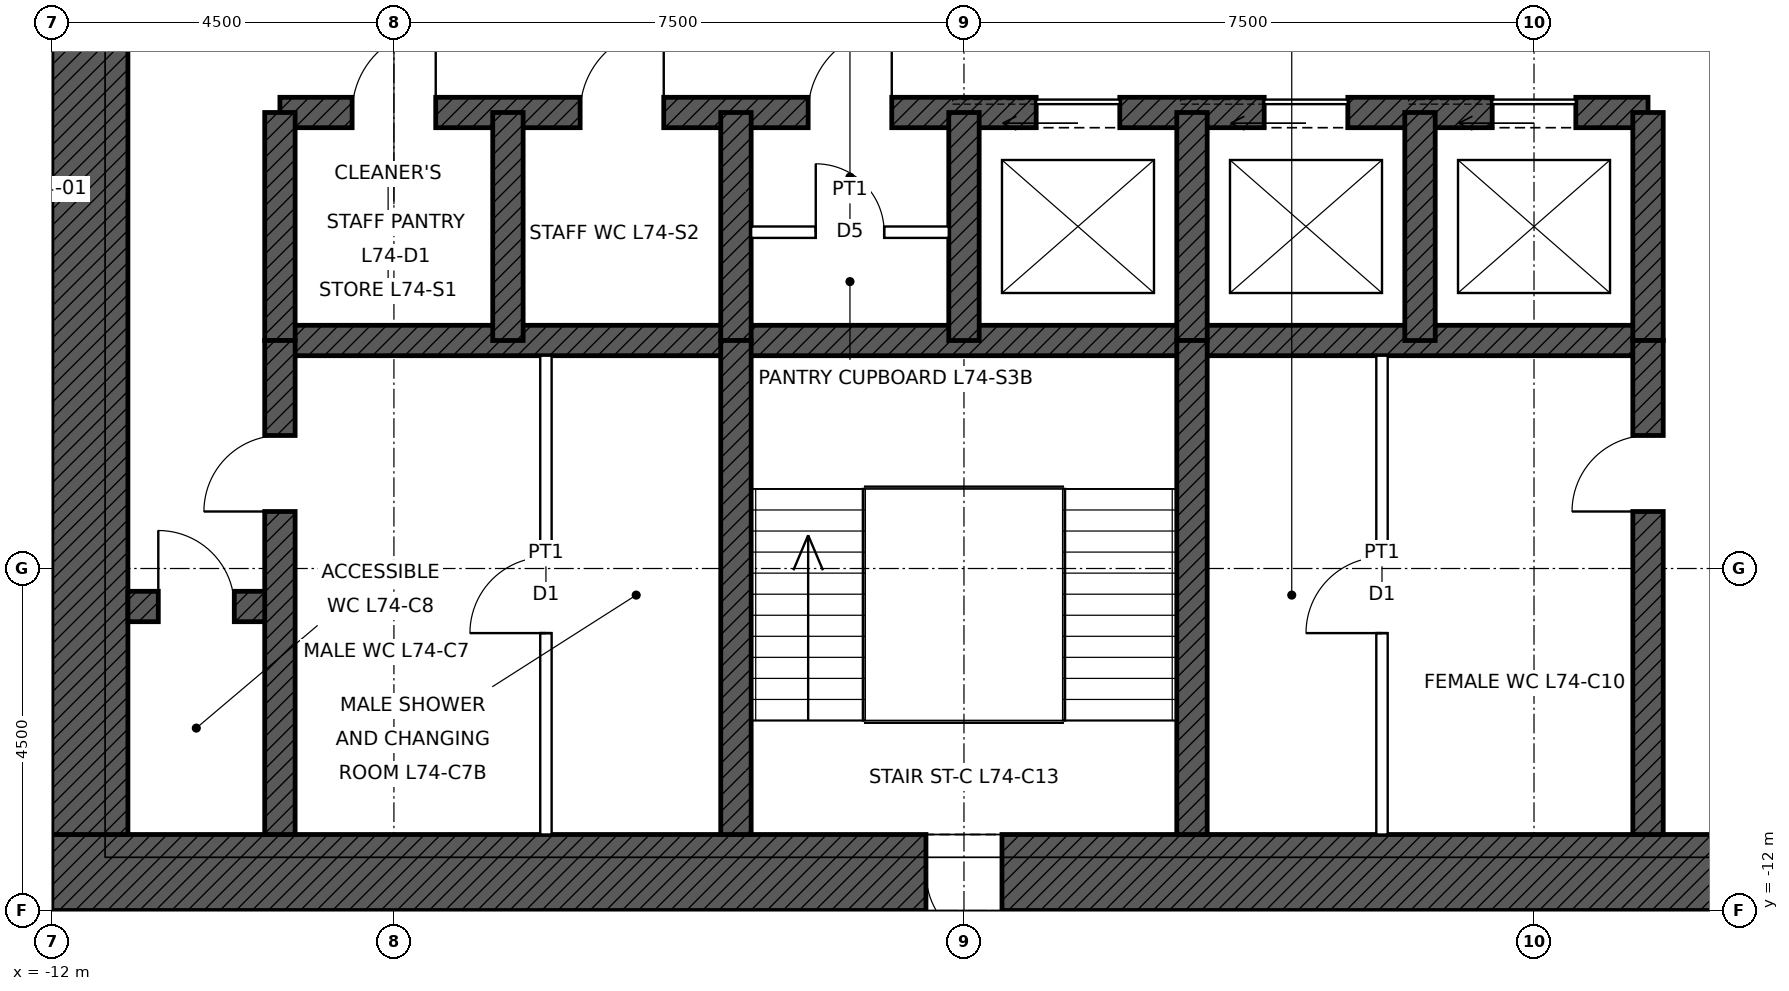
"""IFC4 building model, lengths in metres.
Left out: names, types, materials, properties, quantities, classifications, styles, units other than length and angle.
Written with IfcOpenShell. Run it as: python <this file> out.ifc"""

import sys

from ifc_helpers import new_model, si_unit, direction, frame, frame_2d, origin, place, context, subcontext, project, spatial, rectangle, extrude, element, fill, save


model = new_model("IFC4")
c1 = context("Model", 3, precision=1e-05, world=origin(), true_north=direction((0.0, 1.0)))
c2 = subcontext(c1, "Body", "Model", "MODEL_VIEW")
j1 = project(units=[si_unit("LENGTHUNIT", "METRE"), si_unit("PLANEANGLEUNIT", "RADIAN")], contexts=[c1])
p1 = place(None, origin())
s1 = spatial("IfcSite", under=j1, at=p1, CompositionType="ELEMENT")
p2 = place(p1, origin())
s2 = spatial("IfcBuilding", under=s1, at=p2, CompositionType="ELEMENT")
p3 = place(p2, frame((0.0, 0.0, 331.9)))
s3 = spatial("IfcBuildingStorey", under=s2, at=p3, CompositionType="ELEMENT", Elevation=331.9)
p4 = place(p3, frame((12.0, -11.5, 0.0), z_axis=(0.0, 0.0, 1.0), x_axis=(-1.0, 0.0, 0.0)))
e1 = element("IfcWall", 1, at=p4, inside=s3, PredefinedType="SHEAR", context=c2, shape_type="SweptSolid", body=[
    extrude(rectangle(XDim=24.0, YDim=1.0, at=frame_2d((12.0, 0.0))), origin(), (0.0, 0.0, 1.0), 4.0),
])
p5 = place(p4, frame((11.5, 0.0, 0.0)))
e2 = element("IfcOpeningElement", 2, at=p5, cuts=e1, PredefinedType="OPENING", context=c2, shape_type="SweptSolid", body=[
    extrude(rectangle(XDim=1.0, YDim=2.1, at=frame_2d((0.5, 1.05))), frame((0.0, 0.51, 0.0), z_axis=(0.0, -1.0, 0.0), x_axis=(1.0, 0.0, 0.0)), (0.0, 0.0, 1.0), 1.02),
])
p6 = place(p4, frame((1.0, 0.0, 0.0)))
e3 = element("IfcOpeningElement", 3, at=p6, cuts=e1, PredefinedType="OPENING", context=c2, shape_type="SweptSolid", body=[
    extrude(rectangle(XDim=1.0, YDim=2.4, at=frame_2d((0.5, 1.2))), frame((0.0, 0.51, 0.0), z_axis=(0.0, -1.0, 0.0), x_axis=(1.0, 0.0, 0.0)), (0.0, 0.0, 1.0), 1.02),
])
p7 = place(p3, frame((-11.5, -11.0, 0.0), z_axis=(0.0, 0.0, 1.0), x_axis=(0.0, 1.0, 0.0)))
e4 = element("IfcWall", 4, at=p7, inside=s3, PredefinedType="SHEAR", context=c2, shape_type="SweptSolid", body=[
    extrude(rectangle(XDim=22.0, YDim=1.0, at=frame_2d((11.0, 0.0))), origin(), (0.0, 0.0, 1.0), 4.0),
])
p8 = place(p7, frame((10.5, 0.0, 0.0)))
e5 = element("IfcOpeningElement", 5, at=p8, cuts=e4, PredefinedType="OPENING", context=c2, shape_type="SweptSolid", body=[
    extrude(rectangle(XDim=1.0, YDim=2.4, at=frame_2d((0.5, 1.2))), frame((0.0, 0.51, 0.0), z_axis=(0.0, -1.0, 0.0), x_axis=(1.0, 0.0, 0.0)), (0.0, 0.0, 1.0), 1.02),
])
p9 = place(p3, frame((-9.0, -1.5, 0.0), z_axis=(0.0, 0.0, 1.0), x_axis=(1.0, 0.0, 0.0)))
e6 = element("IfcWall", 6, at=p9, inside=s3, PredefinedType="SHEAR", context=c2, shape_type="SweptSolid", body=[
    extrude(rectangle(XDim=18.0, YDim=0.4, at=frame_2d((9.0, 0.0))), origin(), (0.0, 0.0, 1.0), 4.0),
])
p10 = place(p9, frame((9.95, 0.0, 0.0)))
e7 = element("IfcOpeningElement", 7, at=p10, cuts=e6, PredefinedType="OPENING", context=c2, shape_type="SweptSolid", body=[
    extrude(rectangle(XDim=1.1, YDim=2.1, at=frame_2d((0.55, 1.05))), frame((0.0, 0.21, 0.0), z_axis=(0.0, -1.0, 0.0), x_axis=(1.0, 0.0, 0.0)), (0.0, 0.0, 1.0), 0.42),
])
p11 = place(p9, frame((12.95, 0.0, 0.0)))
e8 = element("IfcOpeningElement", 8, at=p11, cuts=e6, PredefinedType="OPENING", context=c2, shape_type="SweptSolid", body=[
    extrude(rectangle(XDim=1.1, YDim=2.1, at=frame_2d((0.55, 1.05))), frame((0.0, 0.21, 0.0), z_axis=(0.0, -1.0, 0.0), x_axis=(1.0, 0.0, 0.0)), (0.0, 0.0, 1.0), 0.42),
])
p12 = place(p9, frame((15.95, 0.0, 0.0)))
e9 = element("IfcOpeningElement", 9, at=p12, cuts=e6, PredefinedType="OPENING", context=c2, shape_type="SweptSolid", body=[
    extrude(rectangle(XDim=1.1, YDim=2.1, at=frame_2d((0.55, 1.05))), frame((0.0, 0.21, 0.0), z_axis=(0.0, -1.0, 0.0), x_axis=(1.0, 0.0, 0.0)), (0.0, 0.0, 1.0), 0.42),
])
p13 = place(p9, frame((0.95, 0.0, 0.0)))
e10 = element("IfcOpeningElement", 10, at=p13, cuts=e6, PredefinedType="OPENING", context=c2, shape_type="SweptSolid", body=[
    extrude(rectangle(XDim=1.1, YDim=2.1, at=frame_2d((0.55, 1.05))), frame((0.0, 0.21, 0.0), z_axis=(0.0, -1.0, 0.0), x_axis=(1.0, 0.0, 0.0)), (0.0, 0.0, 1.0), 0.42),
])
p14 = place(p9, frame((3.95, 0.0, 0.0)))
e11 = element("IfcOpeningElement", 11, at=p14, cuts=e6, PredefinedType="OPENING", context=c2, shape_type="SweptSolid", body=[
    extrude(rectangle(XDim=1.1, YDim=2.1, at=frame_2d((0.55, 1.05))), frame((0.0, 0.21, 0.0), z_axis=(0.0, -1.0, 0.0), x_axis=(1.0, 0.0, 0.0)), (0.0, 0.0, 1.0), 0.42),
])
p15 = place(p9, frame((6.95, 0.0, 0.0)))
e12 = element("IfcOpeningElement", 12, at=p15, cuts=e6, PredefinedType="OPENING", context=c2, shape_type="SweptSolid", body=[
    extrude(rectangle(XDim=1.1, YDim=2.1, at=frame_2d((0.55, 1.05))), frame((0.0, 0.21, 0.0), z_axis=(0.0, -1.0, 0.0), x_axis=(1.0, 0.0, 0.0)), (0.0, 0.0, 1.0), 0.42),
])
p16 = place(p3, frame((-9.0, -4.5, 0.0), z_axis=(0.0, 0.0, 1.0), x_axis=(1.0, 0.0, 0.0)))
e13 = element("IfcWall", 13, at=p16, inside=s3, PredefinedType="SHEAR", context=c2, shape_type="SweptSolid", body=[
    extrude(rectangle(XDim=18.0, YDim=0.4, at=frame_2d((9.0, 0.0))), origin(), (0.0, 0.0, 1.0), 4.0),
])
p17 = place(p3, frame((-11.0, -8.0, 0.0), z_axis=(0.0, 0.0, 1.0), x_axis=(1.0, 0.0, 0.0)))
e14 = element("IfcWall", 14, at=p17, inside=s3, PredefinedType="SHEAR", context=c2, shape_type="SweptSolid", body=[
    extrude(rectangle(XDim=2.0, YDim=0.4, at=frame_2d((1.0, 0.0))), origin(), (0.0, 0.0, 1.0), 4.0),
])
p18 = place(p17, frame((0.4, 0.0, 0.0)))
e15 = element("IfcOpeningElement", 15, at=p18, cuts=e14, PredefinedType="OPENING", context=c2, shape_type="SweptSolid", body=[
    extrude(rectangle(XDim=1.0, YDim=2.1, at=frame_2d((0.5, 1.05))), frame((0.0, 0.21, 0.0), z_axis=(0.0, -1.0, 0.0), x_axis=(1.0, 0.0, 0.0)), (0.0, 0.0, 1.0), 0.42),
])
for number, where, z_axis, x_axis in (
    (16, (-9.0, -4.5, 0.0), (0.0, 0.0, 1.0), (0.0, 1.0, 0.0)),
    (17, (9.0, -4.5, 0.0), (0.0, 0.0, 1.0), (0.0, 1.0, 0.0)),
    (18, (-6.0, -4.5, 0.0), (0.0, 0.0, 1.0), (0.0, 1.0, 0.0)),
    (19, (-3.0, -4.5, 0.0), (0.0, 0.0, 1.0), (0.0, 1.0, 0.0)),
    (20, (0.0, -4.5, 0.0), (0.0, 0.0, 1.0), (0.0, 1.0, 0.0)),
    (21, (3.0, -4.5, 0.0), (0.0, 0.0, 1.0), (0.0, 1.0, 0.0)),
    (22, (6.0, -4.5, 0.0), (0.0, 0.0, 1.0), (0.0, 1.0, 0.0)),
):
    element("IfcWall", number, at=place(p3, frame(where, z_axis=z_axis, x_axis=x_axis)), inside=s3, PredefinedType="SHEAR", context=c2, shape_type="SweptSolid", body=[
        extrude(rectangle(XDim=3.0, YDim=0.4, at=frame_2d((1.5, 0.0))), origin(), (0.0, 0.0, 1.0), 4.0),
    ])
p19 = place(p3, frame((-9.0, -11.0, 0.0), z_axis=(0.0, 0.0, 1.0), x_axis=(0.0, 1.0, 0.0)))
e23 = element("IfcWall", 23, at=p19, inside=s3, PredefinedType="SHEAR", context=c2, shape_type="SweptSolid", body=[
    extrude(rectangle(XDim=6.5, YDim=0.4, at=frame_2d((3.25, 0.0))), origin(), (0.0, 0.0, 1.0), 4.0),
])
p20 = place(p19, frame((4.25, 0.0, 0.0)))
e24 = element("IfcOpeningElement", 24, at=p20, cuts=e23, PredefinedType="OPENING", context=c2, shape_type="SweptSolid", body=[
    extrude(rectangle(XDim=1.0, YDim=2.1, at=frame_2d((0.5, 1.05))), frame((0.0, 0.21, 0.0), z_axis=(0.0, -1.0, 0.0), x_axis=(1.0, 0.0, 0.0)), (0.0, 0.0, 1.0), 0.42),
])
p21 = place(p3, frame((9.0, -11.0, 0.0), z_axis=(0.0, 0.0, 1.0), x_axis=(0.0, 1.0, 0.0)))
e25 = element("IfcWall", 25, at=p21, inside=s3, PredefinedType="SHEAR", context=c2, shape_type="SweptSolid", body=[
    extrude(rectangle(XDim=6.5, YDim=0.4, at=frame_2d((3.25, 0.0))), origin(), (0.0, 0.0, 1.0), 4.0),
])
p22 = place(p21, frame((4.25, 0.0, 0.0)))
e26 = element("IfcOpeningElement", 26, at=p22, cuts=e25, PredefinedType="OPENING", context=c2, shape_type="SweptSolid", body=[
    extrude(rectangle(XDim=1.0, YDim=2.1, at=frame_2d((0.5, 1.05))), frame((0.0, 0.21, 0.0), z_axis=(0.0, -1.0, 0.0), x_axis=(1.0, 0.0, 0.0)), (0.0, 0.0, 1.0), 0.42),
])
for number, where, z_axis, x_axis in (
    (27, (-3.0, -11.0, 0.0), (0.0, 0.0, 1.0), (0.0, 1.0, 0.0)),
    (28, (3.0, -11.0, 0.0), (0.0, 0.0, 1.0), (0.0, 1.0, 0.0)),
):
    element("IfcWall", number, at=place(p3, frame(where, z_axis=z_axis, x_axis=x_axis)), inside=s3, PredefinedType="SHEAR", context=c2, shape_type="SweptSolid", body=[
        extrude(rectangle(XDim=6.5, YDim=0.4, at=frame_2d((3.25, 0.0))), origin(), (0.0, 0.0, 1.0), 4.0),
    ])
p23 = place(p3, frame((-5.5, -11.0, 0.0), z_axis=(0.0, 0.0, 1.0), x_axis=(0.0, 1.0, 0.0)))
e29 = element("IfcWall", 29, at=p23, inside=s3, PredefinedType="PARTITIONING", context=c2, shape_type="SweptSolid", body=[
    extrude(rectangle(XDim=6.3, YDim=0.15, at=frame_2d((3.15, 0.0))), origin(), (0.0, 0.0, 1.0), 3.75),
])
p24 = place(p23, frame((2.65, 0.0, 0.0)))
e30 = element("IfcOpeningElement", 30, at=p24, cuts=e29, PredefinedType="OPENING", context=c2, shape_type="SweptSolid", body=[
    extrude(rectangle(XDim=1.0, YDim=2.1, at=frame_2d((0.5, 1.05))), frame((0.0, 0.085, 0.0), z_axis=(0.0, -1.0, 0.0), x_axis=(1.0, 0.0, 0.0)), (0.0, 0.0, 1.0), 0.17),
])
p25 = place(p3, frame((5.5, -11.0, 0.0), z_axis=(0.0, 0.0, 1.0), x_axis=(0.0, 1.0, 0.0)))
e31 = element("IfcWall", 31, at=p25, inside=s3, PredefinedType="PARTITIONING", context=c2, shape_type="SweptSolid", body=[
    extrude(rectangle(XDim=6.3, YDim=0.15, at=frame_2d((3.15, 0.0))), origin(), (0.0, 0.0, 1.0), 3.75),
])
p26 = place(p25, frame((2.65, 0.0, 0.0)))
e32 = element("IfcOpeningElement", 32, at=p26, cuts=e31, PredefinedType="OPENING", context=c2, shape_type="SweptSolid", body=[
    extrude(rectangle(XDim=1.0, YDim=2.1, at=frame_2d((0.5, 1.05))), frame((0.0, 0.085, 0.0), z_axis=(0.0, -1.0, 0.0), x_axis=(1.0, 0.0, 0.0)), (0.0, 0.0, 1.0), 0.17),
])
p27 = place(p3, frame((-2.8, -3.075, 0.0), z_axis=(0.0, 0.0, 1.0), x_axis=(1.0, 0.0, 0.0)))
e33 = element("IfcWall", 33, at=p27, inside=s3, PredefinedType="PARTITIONING", context=c2, shape_type="SweptSolid", body=[
    extrude(rectangle(XDim=2.6, YDim=0.15, at=frame_2d((1.3, 0.0))), origin(), (0.0, 0.0, 1.0), 3.75),
])
p28 = place(p27, frame((0.85, 0.0, 0.0)))
e34 = element("IfcOpeningElement", 34, at=p28, cuts=e33, PredefinedType="OPENING", context=c2, shape_type="SweptSolid", body=[
    extrude(rectangle(XDim=0.9, YDim=2.1, at=frame_2d((0.45, 1.05))), frame((0.0, 0.085, 0.0), z_axis=(0.0, -1.0, 0.0), x_axis=(1.0, 0.0, 0.0)), (0.0, 0.0, 1.0), 0.17),
])
p29 = place(p5, origin())
e35 = element("IfcDoor", 35, at=p29, inside=s3, OperationType="SINGLE_SWING_LEFT", PredefinedType="DOOR", context=c2, shape_type="SweptSolid", body=[
    extrude(rectangle(XDim=1.0, YDim=2.1, at=frame_2d((0.5, 1.05))), frame((0.0, 0.485, 0.0), z_axis=(0.0, -1.0, 0.0), x_axis=(1.0, 0.0, 0.0)), (0.0, 0.0, 1.0), 0.05),
])
fill(e2, e35)
p30 = place(p20, origin())
e36 = element("IfcDoor", 36, at=p30, inside=s3, OperationType="SINGLE_SWING_LEFT", PredefinedType="DOOR", context=c2, shape_type="SweptSolid", body=[
    extrude(rectangle(XDim=1.0, YDim=2.1, at=frame_2d((0.5, 1.05))), frame((0.0, 0.025, 0.0), z_axis=(0.0, -1.0, 0.0), x_axis=(1.0, 0.0, 0.0)), (0.0, 0.0, 1.0), 0.05),
])
fill(e24, e36)
p31 = place(p22, origin())
e37 = element("IfcDoor", 37, at=p31, inside=s3, OperationType="SINGLE_SWING_LEFT", PredefinedType="DOOR", context=c2, shape_type="SweptSolid", body=[
    extrude(rectangle(XDim=1.0, YDim=2.1, at=frame_2d((0.5, 1.05))), frame((0.0, 0.025, 0.0), z_axis=(0.0, -1.0, 0.0), x_axis=(1.0, 0.0, 0.0)), (0.0, 0.0, 1.0), 0.05),
])
fill(e26, e37)
p32 = place(p18, origin())
e38 = element("IfcDoor", 38, at=p32, inside=s3, OperationType="SINGLE_SWING_LEFT", PredefinedType="DOOR", context=c2, shape_type="SweptSolid", body=[
    extrude(rectangle(XDim=1.0, YDim=2.1, at=frame_2d((0.5, 1.05))), frame((0.0, 0.025, 0.0), z_axis=(0.0, -1.0, 0.0), x_axis=(1.0, 0.0, 0.0)), (0.0, 0.0, 1.0), 0.05),
])
fill(e15, e38)
p33 = place(p10, origin())
e39 = element("IfcDoor", 39, at=p33, inside=s3, OperationType="SLIDING_TO_LEFT", PredefinedType="DOOR", context=c2, shape_type="SweptSolid", body=[
    extrude(rectangle(XDim=1.1, YDim=2.1, at=frame_2d((0.55, 1.05))), frame((0.0, 0.025, 0.0), z_axis=(0.0, -1.0, 0.0), x_axis=(1.0, 0.0, 0.0)), (0.0, 0.0, 1.0), 0.05),
])
fill(e7, e39)
p34 = place(p11, origin())
e40 = element("IfcDoor", 40, at=p34, inside=s3, OperationType="SLIDING_TO_LEFT", PredefinedType="DOOR", context=c2, shape_type="SweptSolid", body=[
    extrude(rectangle(XDim=1.1, YDim=2.1, at=frame_2d((0.55, 1.05))), frame((0.0, 0.025, 0.0), z_axis=(0.0, -1.0, 0.0), x_axis=(1.0, 0.0, 0.0)), (0.0, 0.0, 1.0), 0.05),
])
fill(e8, e40)
p35 = place(p12, origin())
e41 = element("IfcDoor", 41, at=p35, inside=s3, OperationType="SLIDING_TO_LEFT", PredefinedType="DOOR", context=c2, shape_type="SweptSolid", body=[
    extrude(rectangle(XDim=1.1, YDim=2.1, at=frame_2d((0.55, 1.05))), frame((0.0, 0.025, 0.0), z_axis=(0.0, -1.0, 0.0), x_axis=(1.0, 0.0, 0.0)), (0.0, 0.0, 1.0), 0.05),
])
fill(e9, e41)
p36 = place(p24, origin())
e42 = element("IfcDoor", 42, at=p36, inside=s3, OperationType="SINGLE_SWING_LEFT", PredefinedType="DOOR", context=c2, shape_type="SweptSolid", body=[
    extrude(rectangle(XDim=1.0, YDim=2.1, at=frame_2d((0.5, 1.05))), frame((0.0, 0.025, 0.0), z_axis=(0.0, -1.0, 0.0), x_axis=(1.0, 0.0, 0.0)), (0.0, 0.0, 1.0), 0.05),
])
fill(e30, e42)
p37 = place(p26, origin())
e43 = element("IfcDoor", 43, at=p37, inside=s3, OperationType="SINGLE_SWING_LEFT", PredefinedType="DOOR", context=c2, shape_type="SweptSolid", body=[
    extrude(rectangle(XDim=1.0, YDim=2.1, at=frame_2d((0.5, 1.05))), frame((0.0, 0.025, 0.0), z_axis=(0.0, -1.0, 0.0), x_axis=(1.0, 0.0, 0.0)), (0.0, 0.0, 1.0), 0.05),
])
fill(e32, e43)
p38 = place(p13, origin())
e44 = element("IfcDoor", 44, at=p38, inside=s3, OperationType="SINGLE_SWING_RIGHT", PredefinedType="DOOR", context=c2, shape_type="SweptSolid", body=[
    extrude(rectangle(XDim=1.1, YDim=2.1, at=frame_2d((0.55, 1.05))), frame((0.0, 0.025, 0.0), z_axis=(0.0, -1.0, 0.0), x_axis=(1.0, 0.0, 0.0)), (0.0, 0.0, 1.0), 0.05),
])
fill(e10, e44)
p39 = place(p14, origin())
e45 = element("IfcDoor", 45, at=p39, inside=s3, OperationType="SINGLE_SWING_RIGHT", PredefinedType="DOOR", context=c2, shape_type="SweptSolid", body=[
    extrude(rectangle(XDim=1.1, YDim=2.1, at=frame_2d((0.55, 1.05))), frame((0.0, 0.025, 0.0), z_axis=(0.0, -1.0, 0.0), x_axis=(1.0, 0.0, 0.0)), (0.0, 0.0, 1.0), 0.05),
])
fill(e11, e45)
p40 = place(p15, origin())
e46 = element("IfcDoor", 46, at=p40, inside=s3, OperationType="SINGLE_SWING_RIGHT", PredefinedType="DOOR", context=c2, shape_type="SweptSolid", body=[
    extrude(rectangle(XDim=1.1, YDim=2.1, at=frame_2d((0.55, 1.05))), frame((0.0, 0.025, 0.0), z_axis=(0.0, -1.0, 0.0), x_axis=(1.0, 0.0, 0.0)), (0.0, 0.0, 1.0), 0.05),
])
fill(e12, e46)
p41 = place(p28, origin())
e47 = element("IfcDoor", 47, at=p41, inside=s3, OperationType="SINGLE_SWING_LEFT", PredefinedType="DOOR", context=c2, shape_type="SweptSolid", body=[
    extrude(rectangle(XDim=0.9, YDim=2.1, at=frame_2d((0.45, 1.05))), frame((0.0, 0.025, 0.0), z_axis=(0.0, -1.0, 0.0), x_axis=(1.0, 0.0, 0.0)), (0.0, 0.0, 1.0), 0.05),
])
fill(e34, e47)
save(model, sys.argv[1])
